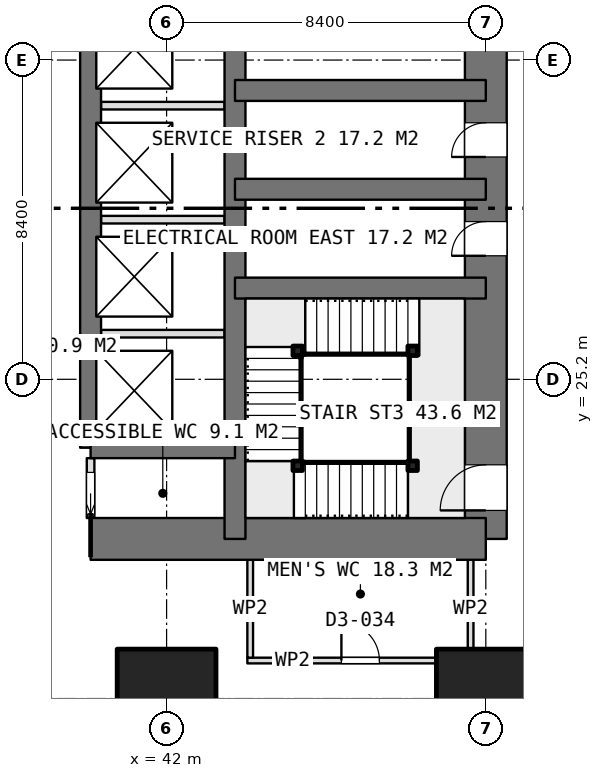
"""IFC4 building model, lengths in metres.
Left out: names, types, materials, properties, quantities, classifications, styles, units other than length and angle.
Written with IfcOpenShell. Run it as: python <this file> out.ifc"""

import sys

from ifc_helpers import new_model, si_unit, direction, frame, frame_2d, origin, origin_2d, place, context, subcontext, project, spatial, rectangle, extrude, element, fill, save


model = new_model("IFC4")
c1 = context("Model", 3, precision=1e-05, world=origin(), true_north=direction((0.0, 1.0)))
c2 = subcontext(c1, "Body", "Model", "MODEL_VIEW")
j1 = project(units=[si_unit("LENGTHUNIT", "METRE"), si_unit("PLANEANGLEUNIT", "RADIAN")], contexts=[c1])
p1 = place(None, origin())
s1 = spatial("IfcSite", under=j1, at=p1, CompositionType="ELEMENT")
p2 = place(p1, origin())
s2 = spatial("IfcBuilding", under=s1, at=p2, CompositionType="ELEMENT")
p3 = place(p2, frame((0.0, 0.0, 29.15)))
s3 = spatial("IfcBuildingStorey", under=s2, at=p3, CompositionType="ELEMENT", Elevation=29.15)
p4 = place(p3, frame((40.0, 21.0, 0.0), z_axis=(0.0, 0.0, 1.0), x_axis=(1.0, 0.0, 0.0)))
e1 = element("IfcWall", 1, at=p4, inside=s3, PredefinedType="SHEAR", context=c2, shape_type="SweptSolid", body=[
    extrude(rectangle(XDim=10.4, YDim=1.1, at=frame_2d((5.2, 0.0))), origin(), (0.0, 0.0, 1.0), 3.75),
])
p5 = place(p3, frame((50.4, 21.0, 0.0), z_axis=(0.0, 0.0, 1.0), x_axis=(0.0, 1.0, 0.0)))
e2 = element("IfcWall", 2, at=p5, inside=s3, PredefinedType="SHEAR", context=c2, shape_type="SweptSolid", body=[
    extrude(rectangle(XDim=25.2, YDim=1.1, at=frame_2d((12.6, 0.0))), origin(), (0.0, 0.0, 1.0), 3.75),
])
p6 = place(p5, frame((16.2, 0.0, 0.0)))
e3 = element("IfcOpeningElement", 3, at=p6, cuts=e2, PredefinedType="OPENING", context=c2, shape_type="SweptSolid", body=[
    extrude(rectangle(XDim=1.2, YDim=2.1, at=frame_2d((0.6, 1.05))), frame((0.0, 0.56, 0.0), z_axis=(0.0, -1.0, 0.0), x_axis=(1.0, 0.0, 0.0)), (0.0, 0.0, 1.0), 1.12),
])
p7 = place(p5, frame((10.05, 0.0, 0.0)))
e4 = element("IfcOpeningElement", 4, at=p7, cuts=e2, PredefinedType="OPENING", context=c2, shape_type="SweptSolid", body=[
    extrude(rectangle(XDim=0.9, YDim=2.1, at=frame_2d((0.45, 1.05))), frame((0.0, 0.56, 0.0), z_axis=(0.0, -1.0, 0.0), x_axis=(1.0, 0.0, 0.0)), (0.0, 0.0, 1.0), 1.12),
])
p8 = place(p5, frame((7.45, 0.0, 0.0)))
e5 = element("IfcOpeningElement", 5, at=p8, cuts=e2, PredefinedType="OPENING", context=c2, shape_type="SweptSolid", body=[
    extrude(rectangle(XDim=0.9, YDim=2.1, at=frame_2d((0.45, 1.05))), frame((0.0, 0.56, 0.0), z_axis=(0.0, -1.0, 0.0), x_axis=(1.0, 0.0, 0.0)), (0.0, 0.0, 1.0), 1.12),
])
p9 = place(p5, frame((0.75, 0.0, 0.0)))
e6 = element("IfcOpeningElement", 6, at=p9, cuts=e2, PredefinedType="OPENING", context=c2, shape_type="SweptSolid", body=[
    extrude(rectangle(XDim=1.2, YDim=2.1, at=frame_2d((0.6, 1.05))), frame((0.0, 0.56, 0.0), z_axis=(0.0, -1.0, 0.0), x_axis=(1.0, 0.0, 0.0)), (0.0, 0.0, 1.0), 1.12),
])
p10 = place(p3, frame((43.8, 21.0, 0.0), z_axis=(0.0, 0.0, 1.0), x_axis=(0.0, 1.0, 0.0)))
e7 = element("IfcWall", 7, at=p10, inside=s3, PredefinedType="SHEAR", context=c2, shape_type="SweptSolid", body=[
    extrude(rectangle(XDim=25.2, YDim=0.55, at=frame_2d((12.6, 0.0))), origin(), (0.0, 0.0, 1.0), 3.75),
])
p11 = place(p3, frame((40.0, 23.4, 0.0), z_axis=(0.0, 0.0, 1.0), x_axis=(0.0, 1.0, 0.0)))
e8 = element("IfcWall", 8, at=p11, inside=s3, PredefinedType="SHEAR", context=c2, shape_type="SweptSolid", body=[
    extrude(rectangle(XDim=18.0, YDim=0.55, at=frame_2d((9.0, 0.0))), origin(), (0.0, 0.0, 1.0), 3.75),
])
p12 = place(p3, frame((40.0, 23.4, 0.0), z_axis=(0.0, 0.0, 1.0), x_axis=(1.0, 0.0, 0.0)))
e9 = element("IfcWall", 9, at=p12, inside=s3, PredefinedType="SHEAR", context=c2, shape_type="SweptSolid", body=[
    extrude(rectangle(XDim=3.8, YDim=0.55, at=frame_2d((1.9, 0.0))), origin(), (0.0, 0.0, 1.0), 3.75),
])
for number, where, z_axis, x_axis in (
    (10, (43.8, 27.6, 0.0), (0.0, 0.0, 1.0), (1.0, 0.0, 0.0)),
    (11, (43.8, 30.2, 0.0), (0.0, 0.0, 1.0), (1.0, 0.0, 0.0)),
    (12, (43.8, 32.8, 0.0), (0.0, 0.0, 1.0), (1.0, 0.0, 0.0)),
):
    element("IfcWall", number, at=place(p3, frame(where, z_axis=z_axis, x_axis=x_axis)), inside=s3, PredefinedType="SHEAR", context=c2, shape_type="SweptSolid", body=[
        extrude(rectangle(XDim=6.6, YDim=0.55, at=frame_2d((3.3, 0.0))), origin(), (0.0, 0.0, 1.0), 3.75),
    ])
for number, where, z_axis, x_axis in (
    (13, (42.0, 16.8, 0.0), (0.0, 0.0, 1.0), (1.0, 0.0, 0.0)),
    (14, (50.4, 16.8, 0.0), (0.0, 0.0, 1.0), (1.0, 0.0, 0.0)),
):
    element("IfcColumn", number, at=place(p3, frame(where, z_axis=z_axis, x_axis=x_axis)), inside=s3, PredefinedType="COLUMN", context=c2, shape_type="SweptSolid", body=[
        extrude(rectangle(XDim=2.6, YDim=2.6, at=origin_2d()), origin(), (0.0, 0.0, 1.0), 3.75),
    ])
for number, where, z_axis, x_axis in (
    (15, (40.275, 26.4, 0.0), (0.0, 0.0, 1.0), (1.0, 0.0, 0.0)),
    (16, (40.275, 29.4, 0.0), (0.0, 0.0, 1.0), (1.0, 0.0, 0.0)),
    (17, (40.275, 32.4, 0.0), (0.0, 0.0, 1.0), (1.0, 0.0, 0.0)),
):
    element("IfcWall", number, at=place(p3, frame(where, z_axis=z_axis, x_axis=x_axis)), inside=s3, PredefinedType="PARTITIONING", context=c2, shape_type="SweptSolid", body=[
        extrude(rectangle(XDim=3.25, YDim=0.2, at=frame_2d((1.625, 0.0))), origin(), (0.0, 0.0, 1.0), 3.5),
    ])
p13 = place(p3, frame((40.0, 21.55, 0.0), z_axis=(0.0, 0.0, 1.0), x_axis=(0.0, 1.0, 0.0)))
e18 = element("IfcWall", 18, at=p13, inside=s3, PredefinedType="PARTITIONING", context=c2, shape_type="SweptSolid", body=[
    extrude(rectangle(XDim=1.575, YDim=0.2, at=frame_2d((0.788, 0.0))), origin(), (0.0, 0.0, 1.0), 3.5),
])
p14 = place(p13, frame((0.1, 0.0, 0.0)))
e19 = element("IfcOpeningElement", 19, at=p14, cuts=e18, PredefinedType="OPENING", context=c2, shape_type="SweptSolid", body=[
    extrude(rectangle(XDim=1.1, YDim=2.1, at=frame_2d((0.55, 1.05))), frame((0.0, 0.11, 0.0), z_axis=(0.0, -1.0, 0.0), x_axis=(1.0, 0.0, 0.0)), (0.0, 0.0, 1.0), 0.22),
])
p15 = place(p3, frame((44.125, 17.8, 0.0), z_axis=(0.0, 0.0, 1.0), x_axis=(1.0, 0.0, 0.0)))
e20 = element("IfcWall", 20, at=p15, inside=s3, PredefinedType="PARTITIONING", context=c2, shape_type="SweptSolid", body=[
    extrude(rectangle(XDim=5.95, YDim=0.15, at=frame_2d((2.975, 0.0))), origin(), (0.0, 0.0, 1.0), 3.5),
])
p16 = place(p15, frame((2.475, 0.0, 0.0)))
e21 = element("IfcOpeningElement", 21, at=p16, cuts=e20, PredefinedType="OPENING", context=c2, shape_type="SweptSolid", body=[
    extrude(rectangle(XDim=1.0, YDim=2.1, at=frame_2d((0.5, 1.05))), frame((0.0, 0.085, 0.0), z_axis=(0.0, -1.0, 0.0), x_axis=(1.0, 0.0, 0.0)), (0.0, 0.0, 1.0), 0.17),
])
for number, where, z_axis, x_axis in (
    (22, (44.2, 17.875, 0.0), (0.0, 0.0, 1.0), (0.0, 1.0, 0.0)),
    (23, (50.0, 17.875, 0.0), (0.0, 0.0, 1.0), (0.0, 1.0, 0.0)),
):
    element("IfcWall", number, at=place(p3, frame(where, z_axis=z_axis, x_axis=x_axis)), inside=s3, PredefinedType="PARTITIONING", context=c2, shape_type="SweptSolid", body=[
        extrude(rectangle(XDim=2.575, YDim=0.15, at=frame_2d((1.288, 0.0))), origin(), (0.0, 0.0, 1.0), 3.5),
    ])
for number, where, z_axis, x_axis in (
    (24, (48.475, 22.925, 0.0), (0.0, 0.0, 1.0), (1.0, 0.0, 0.0)),
    (25, (45.45, 22.925, 0.0), (0.0, 0.0, 1.0), (1.0, 0.0, 0.0)),
    (26, (45.45, 25.95, 0.0), (0.0, 0.0, 1.0), (1.0, 0.0, 0.0)),
    (27, (48.475, 25.95, 0.0), (0.0, 0.0, 1.0), (1.0, 0.0, 0.0)),
):
    element("IfcColumn", number, at=place(p3, frame(where, z_axis=z_axis, x_axis=x_axis)), inside=s3, PredefinedType="COLUMN", context=c2, shape_type="SweptSolid", body=[
        extrude(rectangle(XDim=0.25, YDim=0.25, at=origin_2d()), origin(), (0.0, 0.0, 1.0), 3.75),
    ])
p17 = place(p7, origin())
e28 = element("IfcDoor", 28, at=p17, inside=s3, OperationType="SINGLE_SWING_LEFT", PredefinedType="DOOR", context=c2, shape_type="SweptSolid", body=[
    extrude(rectangle(XDim=0.9, YDim=2.1, at=frame_2d((0.45, 1.05))), frame((0.0, 0.025, 0.0), z_axis=(0.0, -1.0, 0.0), x_axis=(1.0, 0.0, 0.0)), (0.0, 0.0, 1.0), 0.05),
])
fill(e4, e28)
p18 = place(p8, origin())
e29 = element("IfcDoor", 29, at=p18, inside=s3, OperationType="SINGLE_SWING_LEFT", PredefinedType="DOOR", context=c2, shape_type="SweptSolid", body=[
    extrude(rectangle(XDim=0.9, YDim=2.1, at=frame_2d((0.45, 1.05))), frame((0.0, 0.025, 0.0), z_axis=(0.0, -1.0, 0.0), x_axis=(1.0, 0.0, 0.0)), (0.0, 0.0, 1.0), 0.05),
])
fill(e5, e29)
p19 = place(p14, origin())
e30 = element("IfcDoor", 30, at=p19, inside=s3, OperationType="SLIDING_TO_LEFT", PredefinedType="DOOR", context=c2, shape_type="SweptSolid", body=[
    extrude(rectangle(XDim=1.1, YDim=2.1, at=frame_2d((0.55, 1.05))), frame((0.0, 0.025, 0.0), z_axis=(0.0, -1.0, 0.0), x_axis=(1.0, 0.0, 0.0)), (0.0, 0.0, 1.0), 0.05),
])
fill(e19, e30)
p20 = place(p16, origin())
e31 = element("IfcDoor", 31, at=p20, inside=s3, OperationType="SINGLE_SWING_LEFT", PredefinedType="DOOR", context=c2, shape_type="SweptSolid", body=[
    extrude(rectangle(XDim=1.0, YDim=2.1, at=frame_2d((0.5, 1.05))), frame((0.0, 0.025, 0.0), z_axis=(0.0, -1.0, 0.0), x_axis=(1.0, 0.0, 0.0)), (0.0, 0.0, 1.0), 0.05),
])
fill(e21, e31)
p21 = place(p9, origin())
e32 = element("IfcDoor", 32, at=p21, inside=s3, OperationType="SINGLE_SWING_RIGHT", PredefinedType="DOOR", context=c2, shape_type="SweptSolid", body=[
    extrude(rectangle(XDim=1.2, YDim=2.1, at=frame_2d((0.6, 1.05))), frame((0.0, 0.025, 0.0), z_axis=(0.0, -1.0, 0.0), x_axis=(1.0, 0.0, 0.0)), (0.0, 0.0, 1.0), 0.05),
])
fill(e6, e32)
save(model, sys.argv[1])
